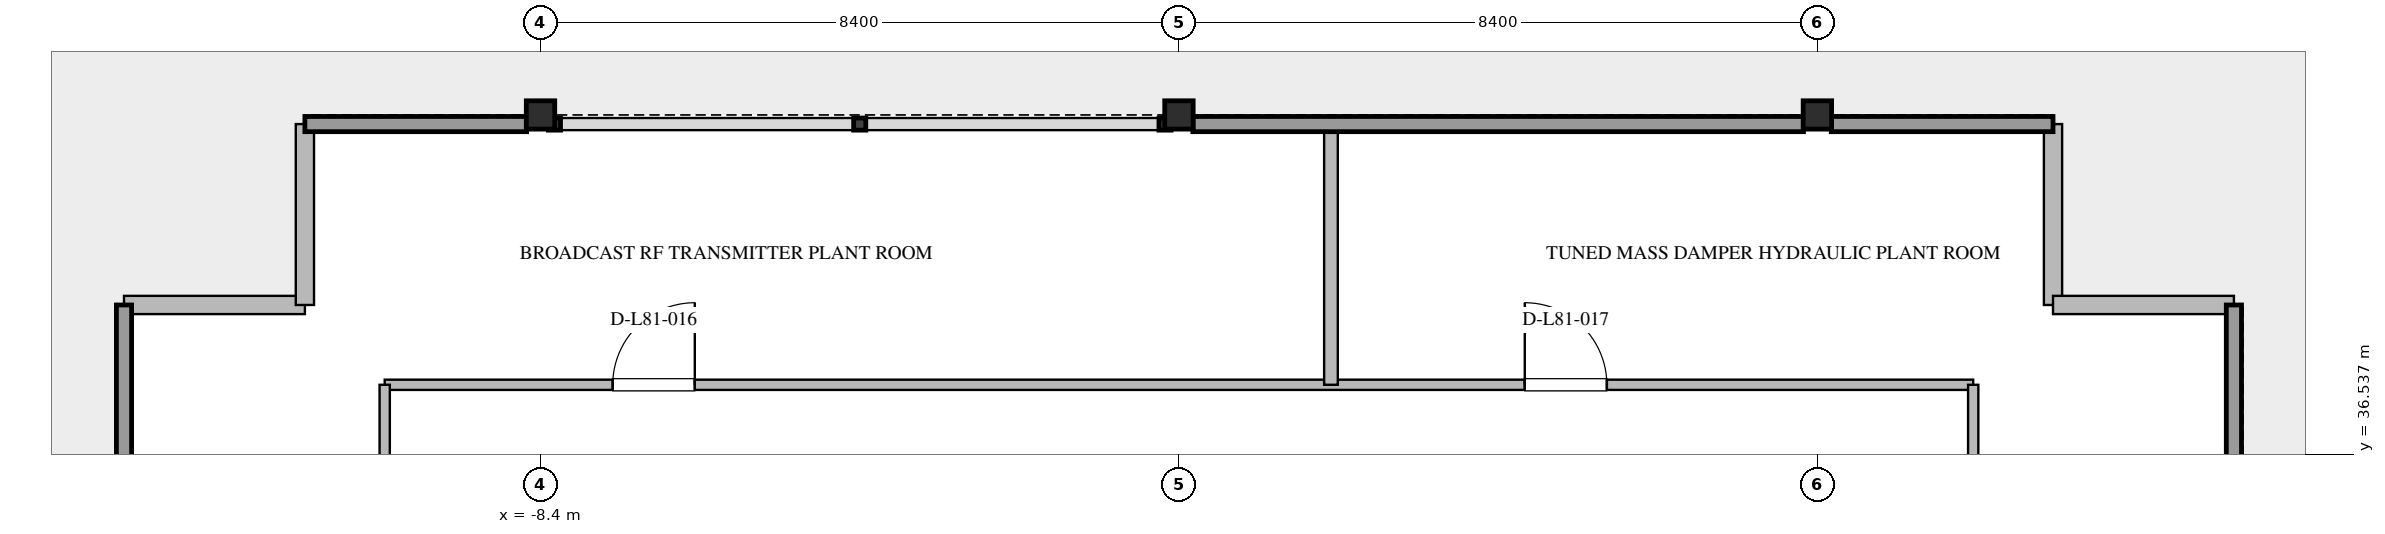
"""IFC4 building model, lengths in metres.
Left out: names, types, materials, properties, quantities, classifications, styles, units other than length and angle.
Written with IfcOpenShell. Run it as: python <this file> out.ifc"""

import sys

from ifc_helpers import new_model, si_unit, direction, frame, frame_2d, origin, origin_2d, place, context, subcontext, project, spatial, rectangle, i_section, extrude, element, fill, save


model = new_model("IFC4")
c1 = context("Model", 3, precision=1e-05, world=origin(), true_north=direction((0.0, 1.0)))
c2 = subcontext(c1, "Body", "Model", "MODEL_VIEW")
j1 = project(units=[si_unit("LENGTHUNIT", "METRE"), si_unit("PLANEANGLEUNIT", "RADIAN")], contexts=[c1])
p1 = place(None, origin())
s1 = spatial("IfcSite", under=j1, at=p1, CompositionType="ELEMENT")
p2 = place(p1, origin())
s2 = spatial("IfcBuilding", under=s1, at=p2, CompositionType="ELEMENT")
p3 = place(p2, frame((0.0, 0.0, 311.4)))
s3 = spatial("IfcBuildingStorey", under=s2, at=p3, CompositionType="ELEMENT", Elevation=311.4)
for number, where, z_axis, x_axis in (
    (1, (-8.4, 41.0, -0.32), (0.0, 0.0, 1.0), (1.0, 0.0, 0.0)),
    (2, (0.0, 41.0, -0.32), (0.0, 0.0, 1.0), (1.0, 0.0, 0.0)),
    (3, (8.4, 41.0, -0.32), (0.0, 0.0, 1.0), (1.0, 0.0, 0.0)),
):
    element("IfcColumn", number, at=place(p3, frame(where, z_axis=z_axis, x_axis=x_axis)), inside=s3, PredefinedType="COLUMN", context=c2, shape_type="SweptSolid", body=[
        extrude(i_section(OverallWidth=0.374, OverallDepth=0.372, WebThickness=0.016, FlangeThickness=0.026, FilletRadius=0.025, at=origin_2d()), origin(), (0.0, 0.0, 1.0), 4.317),
    ])
for number, where, z_axis, x_axis in (
    (4, (-13.88, 38.5, 0.0), (0.0, 0.0, 1.0), (1.0, 0.0, 0.0)),
    (5, (-11.5, 38.5, 0.0), (0.0, 0.0, 1.0), (0.0, 1.0, 0.0)),
    (6, (11.5, 40.88, 0.0), (0.0, 0.0, 1.0), (0.0, -1.0, 0.0)),
    (7, (11.5, 38.5, 0.0), (0.0, 0.0, 1.0), (1.0, 0.0, 0.0)),
):
    element("IfcWall", number, at=place(p3, frame(where, z_axis=z_axis, x_axis=x_axis)), inside=s3, PredefinedType="STANDARD", context=c2, shape_type="SweptSolid", body=[
        extrude(rectangle(XDim=2.38, YDim=0.24, at=frame_2d((1.19, 0.0))), origin(), (0.0, 0.0, 1.0), 3.68),
    ])
p4 = place(p3, frame((-10.45, 37.45, 0.0), z_axis=(0.0, 0.0, 1.0), x_axis=(1.0, 0.0, 0.0)))
e8 = element("IfcWall", 8, at=p4, inside=s3, PredefinedType="PARTITIONING", context=c2, shape_type="SweptSolid", body=[
    extrude(rectangle(XDim=20.9, YDim=0.135, at=frame_2d((10.45, 0.0))), origin(), (0.0, 0.0, 1.0), 3.68),
])
p5 = place(p4, frame((3.0, 0.0, 0.0)))
e9 = element("IfcOpeningElement", 9, at=p5, cuts=e8, PredefinedType="OPENING", context=c2, shape_type="SweptSolid", body=[
    extrude(rectangle(XDim=1.08, YDim=2.04, at=frame_2d((0.54, 1.02))), frame((0.0, 0.077, 0.0), z_axis=(0.0, -1.0, 0.0), x_axis=(1.0, 0.0, 0.0)), (0.0, 0.0, 1.0), 0.155),
])
p6 = place(p4, frame((15.0, 0.0, 0.0)))
e10 = element("IfcOpeningElement", 10, at=p6, cuts=e8, PredefinedType="OPENING", context=c2, shape_type="SweptSolid", body=[
    extrude(rectangle(XDim=1.08, YDim=2.04, at=frame_2d((0.54, 1.02))), frame((0.0, 0.077, 0.0), z_axis=(0.0, -1.0, 0.0), x_axis=(1.0, 0.0, 0.0)), (0.0, 0.0, 1.0), 0.155),
])
p7 = place(p3, frame((-10.45, 16.55, 0.0), z_axis=(0.0, 0.0, 1.0), x_axis=(0.0, 1.0, 0.0)))
e11 = element("IfcWall", 11, at=p7, inside=s3, PredefinedType="PARTITIONING", context=c2, shape_type="SweptSolid", body=[
    extrude(rectangle(XDim=20.9, YDim=0.135, at=frame_2d((10.45, 0.0))), origin(), (0.0, 0.0, 1.0), 3.68),
])
p8 = place(p7, frame((8.0, 0.0, 0.0)))
e12 = element("IfcOpeningElement", 12, at=p8, cuts=e11, PredefinedType="OPENING", context=c2, shape_type="SweptSolid", body=[
    extrude(rectangle(XDim=1.08, YDim=2.04, at=frame_2d((0.54, 1.02))), frame((0.0, 0.077, 0.0), z_axis=(0.0, -1.0, 0.0), x_axis=(1.0, 0.0, 0.0)), (0.0, 0.0, 1.0), 0.155),
])
p9 = place(p3, frame((10.45, 16.55, 0.0), z_axis=(0.0, 0.0, 1.0), x_axis=(0.0, 1.0, 0.0)))
e13 = element("IfcWall", 13, at=p9, inside=s3, PredefinedType="PARTITIONING", context=c2, shape_type="SweptSolid", body=[
    extrude(rectangle(XDim=20.9, YDim=0.135, at=frame_2d((10.45, 0.0))), origin(), (0.0, 0.0, 1.0), 3.68),
])
p10 = place(p9, frame((8.0, 0.0, 0.0)))
e14 = element("IfcOpeningElement", 14, at=p10, cuts=e13, PredefinedType="OPENING", context=c2, shape_type="SweptSolid", body=[
    extrude(rectangle(XDim=1.08, YDim=2.04, at=frame_2d((0.54, 1.02))), frame((0.0, 0.077, 0.0), z_axis=(0.0, -1.0, 0.0), x_axis=(1.0, 0.0, 0.0)), (0.0, 0.0, 1.0), 0.155),
])
p11 = place(p3, frame((2.0, 37.45, 0.0), z_axis=(0.0, 0.0, 1.0), x_axis=(0.0, 1.0, 0.0)))
e15 = element("IfcWall", 15, at=p11, inside=s3, PredefinedType="SOLIDWALL", context=c2, shape_type="SweptSolid", body=[
    extrude(rectangle(XDim=3.43, YDim=0.18, at=frame_2d((1.715, 0.0))), origin(), (0.0, 0.0, 1.0), 3.68),
])
p12 = place(p5, origin())
e16 = element("IfcDoor", 16, at=p12, inside=s3, OperationType="SINGLE_SWING_RIGHT", PredefinedType="DOOR", context=c2, shape_type="SweptSolid", body=[
    extrude(rectangle(XDim=1.08, YDim=2.04, at=frame_2d((0.54, 1.02))), frame((0.0, 0.025, 0.0), z_axis=(0.0, -1.0, 0.0), x_axis=(1.0, 0.0, 0.0)), (0.0, 0.0, 1.0), 0.05),
])
fill(e9, e16)
p13 = place(p6, origin())
e17 = element("IfcDoor", 17, at=p13, inside=s3, OperationType="SINGLE_SWING_LEFT", PredefinedType="DOOR", context=c2, shape_type="SweptSolid", body=[
    extrude(rectangle(XDim=1.08, YDim=2.04, at=frame_2d((0.54, 1.02))), frame((0.0, 0.025, 0.0), z_axis=(0.0, -1.0, 0.0), x_axis=(1.0, 0.0, 0.0)), (0.0, 0.0, 1.0), 0.05),
])
fill(e10, e17)
save(model, sys.argv[1])
